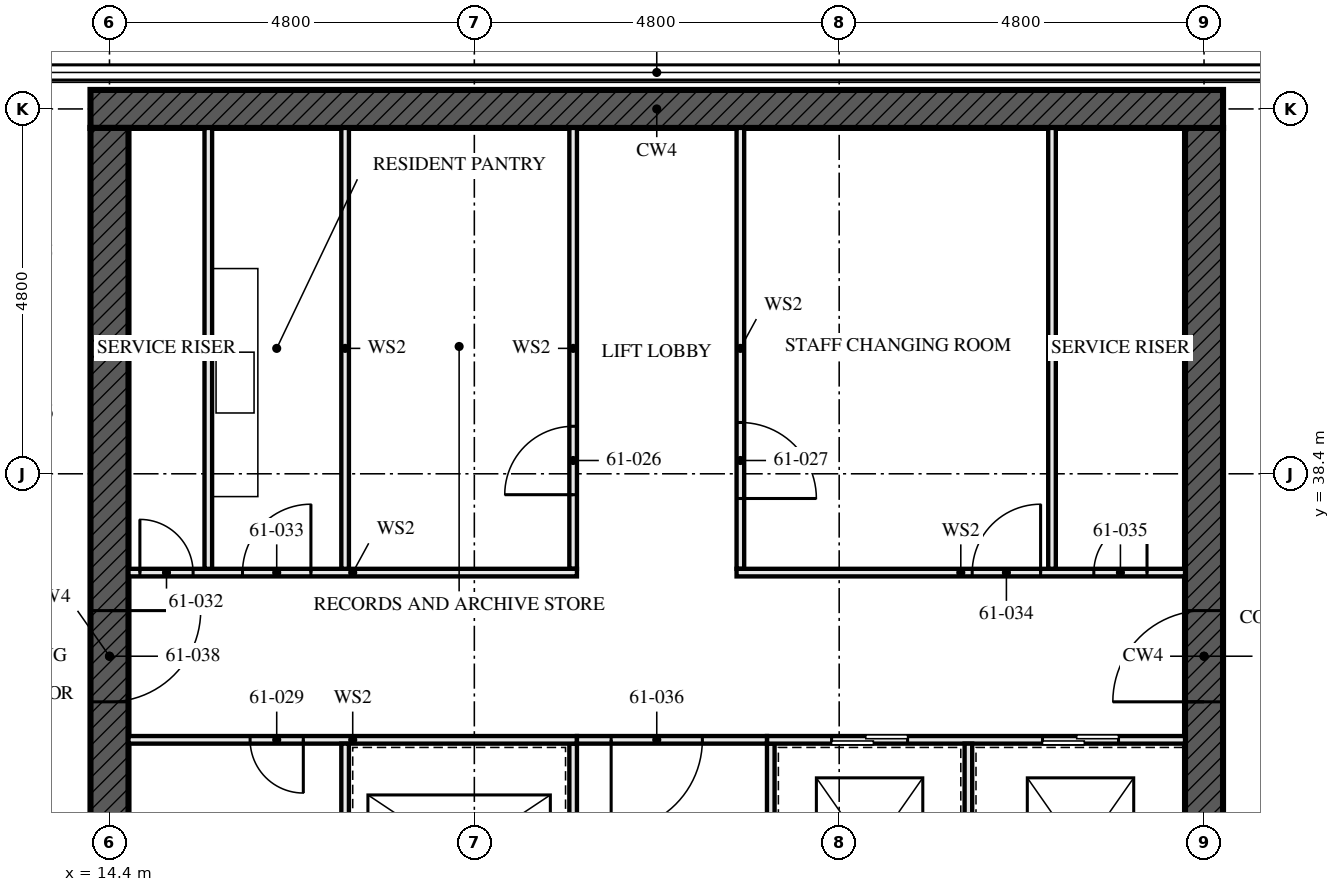
"""IFC4 building model, lengths in metres.
Left out: names, types, materials, properties, quantities, classifications, styles, units other than length and angle.
Written with IfcOpenShell. Run it as: python <this file> out.ifc"""

import sys

from ifc_helpers import new_model, si_unit, direction, frame, frame_2d, origin, place, context, subcontext, project, spatial, rectangle, extrude, element, fill, save


model = new_model("IFC4")
c1 = context("Model", 3, precision=1e-05, world=origin(), true_north=direction((0.0, 1.0)))
c2 = subcontext(c1, "Body", "Model", "MODEL_VIEW")
j1 = project(units=[si_unit("LENGTHUNIT", "METRE"), si_unit("PLANEANGLEUNIT", "RADIAN")], contexts=[c1])
p1 = place(None, origin())
s1 = spatial("IfcSite", under=j1, at=p1, CompositionType="ELEMENT")
p2 = place(p1, origin())
s2 = spatial("IfcBuilding", under=s1, at=p2, CompositionType="ELEMENT")
p3 = place(p2, frame((0.0, 0.0, 222.5)))
s3 = spatial("IfcBuildingStorey", under=s2, at=p3, CompositionType="ELEMENT", Elevation=222.5)
p4 = place(p3, frame((29.05, 43.2, -0.17), z_axis=(0.0, 0.0, 1.0), x_axis=(-1.0, 0.0, 0.0)))
e1 = element("IfcWall", 1, at=p4, inside=s3, PredefinedType="SHEAR", context=c2, shape_type="SweptSolid", body=[
    extrude(rectangle(XDim=14.9, YDim=0.5, at=frame_2d((7.45, 0.0))), origin(), (0.0, 0.0, 1.0), 3.5),
])
p5 = place(p3, frame((14.4, 42.95, -0.17), z_axis=(0.0, 0.0, 1.0), x_axis=(0.0, -1.0, 0.0)))
e2 = element("IfcWall", 2, at=p5, inside=s3, PredefinedType="SHEAR", context=c2, shape_type="SweptSolid", body=[
    extrude(rectangle(XDim=13.9, YDim=0.5, at=frame_2d((6.95, 0.0))), origin(), (0.0, 0.0, 1.0), 3.5),
])
p6 = place(p5, frame((6.35, 0.0, 0.17)))
e3 = element("IfcOpeningElement", 3, at=p6, cuts=e2, PredefinedType="OPENING", context=c2, shape_type="SweptSolid", body=[
    extrude(rectangle(XDim=1.2, YDim=2.1, at=frame_2d((0.6, 1.05))), frame((0.0, 0.26, 0.0), z_axis=(0.0, -1.0, 0.0), x_axis=(1.0, 0.0, 0.0)), (0.0, 0.0, 1.0), 0.521),
])
p7 = place(p3, frame((28.8, 29.05, -0.17), z_axis=(0.0, 0.0, 1.0), x_axis=(0.0, 1.0, 0.0)))
e4 = element("IfcWall", 4, at=p7, inside=s3, PredefinedType="SHEAR", context=c2, shape_type="SweptSolid", body=[
    extrude(rectangle(XDim=13.9, YDim=0.5, at=frame_2d((6.95, 0.0))), origin(), (0.0, 0.0, 1.0), 3.5),
])
p8 = place(p7, frame((6.35, 0.0, 0.17)))
e5 = element("IfcOpeningElement", 5, at=p8, cuts=e4, PredefinedType="OPENING", context=c2, shape_type="SweptSolid", body=[
    extrude(rectangle(XDim=1.2, YDim=2.1, at=frame_2d((0.6, 1.05))), frame((0.0, 0.26, 0.0), z_axis=(0.0, -1.0, 0.0), x_axis=(1.0, 0.0, 0.0)), (0.0, 0.0, 1.0), 0.521),
])
for number, where, z_axis, x_axis in (
    (6, (15.7, 37.15, 0.0), (0.0, 0.0, 1.0), (0.0, 1.0, 0.0)),
    (7, (26.8, 37.15, 0.0), (0.0, 0.0, 1.0), (0.0, 1.0, 0.0)),
):
    element("IfcWall", number, at=place(p3, frame(where, z_axis=z_axis, x_axis=x_axis)), inside=s3, PredefinedType="SOLIDWALL", context=c2, shape_type="SweptSolid", body=[
        extrude(rectangle(XDim=5.8, YDim=0.1, at=frame_2d((2.9, 0.0))), origin(), (0.0, 0.0, 1.0), 3.33),
    ])
p9 = place(p3, frame((20.5, 29.05, 0.0), z_axis=(0.0, 0.0, 1.0), x_axis=(0.0, 1.0, 0.0)))
e8 = element("IfcWall", 8, at=p9, inside=s3, PredefinedType="SOLIDWALL", context=c2, shape_type="SweptSolid", body=[
    extrude(rectangle(XDim=5.8, YDim=0.1, at=frame_2d((2.9, 0.0))), origin(), (0.0, 0.0, 1.0), 3.33),
])
p10 = place(p9, frame((0.8, 0.0, 0.0)))
e9 = element("IfcOpeningElement", 9, at=p10, cuts=e8, PredefinedType="OPENING", context=c2, shape_type="SweptSolid", body=[
    extrude(rectangle(XDim=1.1, YDim=2.3, at=frame_2d((0.55, 1.15))), frame((0.0, 0.061, 0.0), z_axis=(0.0, -1.0, 0.0), x_axis=(1.0, 0.0, 0.0)), (0.0, 0.0, 1.0), 0.121),
])
p11 = place(p9, frame((3.775, 0.0, 0.0)))
e10 = element("IfcOpeningElement", 10, at=p11, cuts=e8, PredefinedType="OPENING", context=c2, shape_type="SweptSolid", body=[
    extrude(rectangle(XDim=1.1, YDim=2.3, at=frame_2d((0.55, 1.15))), frame((0.0, 0.061, 0.0), z_axis=(0.0, -1.0, 0.0), x_axis=(1.0, 0.0, 0.0)), (0.0, 0.0, 1.0), 0.121),
])
p12 = place(p3, frame((20.5, 37.15, 0.0), z_axis=(0.0, 0.0, 1.0), x_axis=(0.0, 1.0, 0.0)))
e11 = element("IfcWall", 11, at=p12, inside=s3, PredefinedType="SOLIDWALL", context=c2, shape_type="SweptSolid", body=[
    extrude(rectangle(XDim=5.8, YDim=0.1, at=frame_2d((2.9, 0.0))), origin(), (0.0, 0.0, 1.0), 3.33),
])
p13 = place(p12, frame((0.975, 0.0, 0.0)))
e12 = element("IfcOpeningElement", 12, at=p13, cuts=e11, PredefinedType="OPENING", context=c2, shape_type="SweptSolid", body=[
    extrude(rectangle(XDim=0.9, YDim=2.1, at=frame_2d((0.45, 1.05))), frame((0.0, 0.061, 0.0), z_axis=(0.0, -1.0, 0.0), x_axis=(1.0, 0.0, 0.0)), (0.0, 0.0, 1.0), 0.121),
])
p14 = place(p3, frame((22.7, 37.15, 0.0), z_axis=(0.0, 0.0, 1.0), x_axis=(0.0, 1.0, 0.0)))
e13 = element("IfcWall", 13, at=p14, inside=s3, PredefinedType="SOLIDWALL", context=c2, shape_type="SweptSolid", body=[
    extrude(rectangle(XDim=5.8, YDim=0.1, at=frame_2d((2.9, 0.0))), origin(), (0.0, 0.0, 1.0), 3.33),
])
p15 = place(p14, frame((0.925, 0.0, 0.0)))
e14 = element("IfcOpeningElement", 14, at=p15, cuts=e13, PredefinedType="OPENING", context=c2, shape_type="SweptSolid", body=[
    extrude(rectangle(XDim=1.0, YDim=2.1, at=frame_2d((0.5, 1.05))), frame((0.0, 0.061, 0.0), z_axis=(0.0, -1.0, 0.0), x_axis=(1.0, 0.0, 0.0)), (0.0, 0.0, 1.0), 0.121),
])
p16 = place(p3, frame((23.1, 29.05, 0.0), z_axis=(0.0, 0.0, 1.0), x_axis=(0.0, 1.0, 0.0)))
e15 = element("IfcWall", 15, at=p16, inside=s3, PredefinedType="SOLIDWALL", context=c2, shape_type="SweptSolid", body=[
    extrude(rectangle(XDim=5.8, YDim=0.1, at=frame_2d((2.9, 0.0))), origin(), (0.0, 0.0, 1.0), 3.33),
])
p17 = place(p16, frame((1.0, 0.0, 0.0)))
e16 = element("IfcOpeningElement", 16, at=p17, cuts=e15, PredefinedType="OPENING", context=c2, shape_type="SweptSolid", body=[
    extrude(rectangle(XDim=0.7, YDim=2.1, at=frame_2d((0.35, 1.05))), frame((0.0, 0.061, 0.0), z_axis=(0.0, -1.0, 0.0), x_axis=(1.0, 0.0, 0.0)), (0.0, 0.0, 1.0), 0.121),
])
p18 = place(p3, frame((14.65, 34.9, 0.0), z_axis=(0.0, 0.0, 1.0), x_axis=(1.0, 0.0, 0.0)))
e17 = element("IfcWall", 17, at=p18, inside=s3, PredefinedType="SOLIDWALL", context=c2, shape_type="SweptSolid", body=[
    extrude(rectangle(XDim=5.9, YDim=0.1, at=frame_2d((2.95, 0.0))), origin(), (0.0, 0.0, 1.0), 3.33),
])
p19 = place(p18, frame((1.6, 0.0, 0.0)))
e18 = element("IfcOpeningElement", 18, at=p19, cuts=e17, PredefinedType="OPENING", context=c2, shape_type="SweptSolid", body=[
    extrude(rectangle(XDim=0.7, YDim=2.1, at=frame_2d((0.35, 1.05))), frame((0.0, 0.061, 0.0), z_axis=(0.0, -1.0, 0.0), x_axis=(1.0, 0.0, 0.0)), (0.0, 0.0, 1.0), 0.121),
])
p20 = place(p3, frame((23.05, 34.9, 0.0), z_axis=(0.0, 0.0, 1.0), x_axis=(1.0, 0.0, 0.0)))
e19 = element("IfcWall", 19, at=p20, inside=s3, PredefinedType="SOLIDWALL", context=c2, shape_type="SweptSolid", body=[
    extrude(rectangle(XDim=5.5, YDim=0.1, at=frame_2d((2.75, 0.0))), origin(), (0.0, 0.0, 1.0), 3.33),
])
p21 = place(p20, frame((0.85, 0.0, 0.0)))
e20 = element("IfcOpeningElement", 20, at=p21, cuts=e19, PredefinedType="OPENING", context=c2, shape_type="SweptSolid", body=[
    extrude(rectangle(XDim=1.0, YDim=2.1, at=frame_2d((0.5, 1.05))), frame((0.0, 0.061, 0.0), z_axis=(0.0, -1.0, 0.0), x_axis=(1.0, 0.0, 0.0)), (0.0, 0.0, 1.0), 0.121),
])
p22 = place(p20, frame((3.625, 0.0, 0.0)))
e21 = element("IfcOpeningElement", 21, at=p22, cuts=e19, PredefinedType="OPENING", context=c2, shape_type="SweptSolid", body=[
    extrude(rectangle(XDim=1.0, YDim=2.1, at=frame_2d((0.5, 1.05))), frame((0.0, 0.061, 0.0), z_axis=(0.0, -1.0, 0.0), x_axis=(1.0, 0.0, 0.0)), (0.0, 0.0, 1.0), 0.121),
])
p23 = place(p3, frame((14.65, 37.1, 0.0), z_axis=(0.0, 0.0, 1.0), x_axis=(1.0, 0.0, 0.0)))
e22 = element("IfcWall", 22, at=p23, inside=s3, PredefinedType="SOLIDWALL", context=c2, shape_type="SweptSolid", body=[
    extrude(rectangle(XDim=5.9, YDim=0.1, at=frame_2d((2.95, 0.0))), origin(), (0.0, 0.0, 1.0), 3.33),
])
p24 = place(p23, frame((0.15, 0.0, 0.0)))
e23 = element("IfcOpeningElement", 23, at=p24, cuts=e22, PredefinedType="OPENING", context=c2, shape_type="SweptSolid", body=[
    extrude(rectangle(XDim=0.7, YDim=2.1, at=frame_2d((0.35, 1.05))), frame((0.0, 0.061, 0.0), z_axis=(0.0, -1.0, 0.0), x_axis=(1.0, 0.0, 0.0)), (0.0, 0.0, 1.0), 0.121),
])
p25 = place(p23, frame((1.5, 0.0, 0.0)))
e24 = element("IfcOpeningElement", 24, at=p25, cuts=e22, PredefinedType="OPENING", context=c2, shape_type="SweptSolid", body=[
    extrude(rectangle(XDim=0.9, YDim=2.1, at=frame_2d((0.45, 1.05))), frame((0.0, 0.061, 0.0), z_axis=(0.0, -1.0, 0.0), x_axis=(1.0, 0.0, 0.0)), (0.0, 0.0, 1.0), 0.121),
])
p26 = place(p3, frame((22.65, 37.1, 0.0), z_axis=(0.0, 0.0, 1.0), x_axis=(1.0, 0.0, 0.0)))
e25 = element("IfcWall", 25, at=p26, inside=s3, PredefinedType="SOLIDWALL", context=c2, shape_type="SweptSolid", body=[
    extrude(rectangle(XDim=5.9, YDim=0.1, at=frame_2d((2.95, 0.0))), origin(), (0.0, 0.0, 1.0), 3.33),
])
p27 = place(p26, frame((3.1, 0.0, 0.0)))
e26 = element("IfcOpeningElement", 26, at=p27, cuts=e25, PredefinedType="OPENING", context=c2, shape_type="SweptSolid", body=[
    extrude(rectangle(XDim=0.9, YDim=2.1, at=frame_2d((0.45, 1.05))), frame((0.0, 0.061, 0.0), z_axis=(0.0, -1.0, 0.0), x_axis=(1.0, 0.0, 0.0)), (0.0, 0.0, 1.0), 0.121),
])
p28 = place(p26, frame((4.7, 0.0, 0.0)))
e27 = element("IfcOpeningElement", 27, at=p28, cuts=e25, PredefinedType="OPENING", context=c2, shape_type="SweptSolid", body=[
    extrude(rectangle(XDim=0.7, YDim=2.1, at=frame_2d((0.35, 1.05))), frame((0.0, 0.061, 0.0), z_axis=(0.0, -1.0, 0.0), x_axis=(1.0, 0.0, 0.0)), (0.0, 0.0, 1.0), 0.121),
])
p29 = place(p3, frame((20.55, 34.9, 0.0), z_axis=(0.0, 0.0, 1.0), x_axis=(1.0, 0.0, 0.0)))
e28 = element("IfcWall", 28, at=p29, inside=s3, PredefinedType="SOLIDWALL", context=c2, shape_type="SweptSolid", body=[
    extrude(rectangle(XDim=2.5, YDim=0.1, at=frame_2d((1.25, 0.0))), origin(), (0.0, 0.0, 1.0), 3.33),
])
p30 = place(p29, frame((0.45, 0.0, 0.0)))
e29 = element("IfcOpeningElement", 29, at=p30, cuts=e28, PredefinedType="OPENING", context=c2, shape_type="SweptSolid", body=[
    extrude(rectangle(XDim=1.2, YDim=2.1, at=frame_2d((0.6, 1.05))), frame((0.0, 0.061, 0.0), z_axis=(0.0, -1.0, 0.0), x_axis=(1.0, 0.0, 0.0)), (0.0, 0.0, 1.0), 0.121),
])
for number, where, z_axis, x_axis in (
    (30, (17.5, 29.05, 0.0), (0.0, 0.0, 1.0), (0.0, 1.0, 0.0)),
    (31, (17.5, 37.15, 0.0), (0.0, 0.0, 1.0), (0.0, 1.0, 0.0)),
):
    element("IfcWall", number, at=place(p3, frame(where, z_axis=z_axis, x_axis=x_axis)), inside=s3, PredefinedType="SOLIDWALL", context=c2, shape_type="SweptSolid", body=[
        extrude(rectangle(XDim=5.8, YDim=0.1, at=frame_2d((2.9, 0.0))), origin(), (0.0, 0.0, 1.0), 3.33),
    ])
p31 = place(p3, frame((25.7, 31.95, 0.0), z_axis=(0.0, 0.0, 1.0), x_axis=(0.0, 1.0, 0.0)))
e32 = element("IfcWall", 32, at=p31, inside=s3, PredefinedType="SOLIDWALL", context=c2, shape_type="SweptSolid", body=[
    extrude(rectangle(XDim=2.9, YDim=0.1, at=frame_2d((1.45, 0.0))), origin(), (0.0, 0.0, 1.0), 3.33),
])
p32 = place(p13, origin())
e33 = element("IfcDoor", 33, at=p32, inside=s3, OperationType="SINGLE_SWING_RIGHT", PredefinedType="DOOR", context=c2, shape_type="SweptSolid", body=[
    extrude(rectangle(XDim=0.9, YDim=2.1, at=frame_2d((0.45, 1.05))), frame((0.0, 0.027, 0.0), z_axis=(0.0, -1.0, 0.0), x_axis=(1.0, 0.0, 0.0)), (0.0, 0.0, 1.0), 0.054),
])
fill(e12, e33)
p33 = place(p15, frame((1.0, 0.0, 0.0), z_axis=(0.0, 0.0, 1.0), x_axis=(-1.0, 0.0, 0.0)))
e34 = element("IfcDoor", 34, at=p33, inside=s3, OperationType="SINGLE_SWING_LEFT", PredefinedType="DOOR", context=c2, shape_type="SweptSolid", body=[
    extrude(rectangle(XDim=1.0, YDim=2.1, at=frame_2d((0.5, 1.05))), frame((0.0, 0.027, 0.0), z_axis=(0.0, -1.0, 0.0), x_axis=(1.0, 0.0, 0.0)), (0.0, 0.0, 1.0), 0.054),
])
fill(e14, e34)
p34 = place(p19, frame((0.7, 0.0, 0.0), z_axis=(0.0, 0.0, 1.0), x_axis=(-1.0, 0.0, 0.0)))
e35 = element("IfcDoor", 35, at=p34, inside=s3, OperationType="SINGLE_SWING_RIGHT", PredefinedType="DOOR", context=c2, shape_type="SweptSolid", body=[
    extrude(rectangle(XDim=0.7, YDim=2.1, at=frame_2d((0.35, 1.05))), frame((0.0, 0.027, 0.0), z_axis=(0.0, -1.0, 0.0), x_axis=(1.0, 0.0, 0.0)), (0.0, 0.0, 1.0), 0.054),
])
fill(e18, e35)
p35 = place(p21, origin())
e36 = element("IfcDoor", 36, at=p35, inside=s3, OperationType="SLIDING_TO_LEFT", PredefinedType="DOOR", context=c2, shape_type="SweptSolid", body=[
    extrude(rectangle(XDim=1.0, YDim=2.1, at=frame_2d((0.5, 1.05))), frame((0.0, 0.05, 0.0), z_axis=(0.0, -1.0, 0.0), x_axis=(1.0, 0.0, 0.0)), (0.0, 0.0, 1.0), 0.1),
])
fill(e20, e36)
p36 = place(p22, origin())
e37 = element("IfcDoor", 37, at=p36, inside=s3, OperationType="SLIDING_TO_LEFT", PredefinedType="DOOR", context=c2, shape_type="SweptSolid", body=[
    extrude(rectangle(XDim=1.0, YDim=2.1, at=frame_2d((0.5, 1.05))), frame((0.0, 0.05, 0.0), z_axis=(0.0, -1.0, 0.0), x_axis=(1.0, 0.0, 0.0)), (0.0, 0.0, 1.0), 0.1),
])
fill(e21, e37)
p37 = place(p24, origin())
e38 = element("IfcDoor", 38, at=p37, inside=s3, OperationType="SINGLE_SWING_RIGHT", PredefinedType="DOOR", context=c2, shape_type="SweptSolid", body=[
    extrude(rectangle(XDim=0.7, YDim=2.1, at=frame_2d((0.35, 1.05))), frame((0.0, 0.027, 0.0), z_axis=(0.0, -1.0, 0.0), x_axis=(1.0, 0.0, 0.0)), (0.0, 0.0, 1.0), 0.054),
])
fill(e23, e38)
p38 = place(p25, origin())
e39 = element("IfcDoor", 39, at=p38, inside=s3, OperationType="SINGLE_SWING_LEFT", PredefinedType="DOOR", context=c2, shape_type="SweptSolid", body=[
    extrude(rectangle(XDim=0.9, YDim=2.1, at=frame_2d((0.45, 1.05))), frame((0.0, 0.027, 0.0), z_axis=(0.0, -1.0, 0.0), x_axis=(1.0, 0.0, 0.0)), (0.0, 0.0, 1.0), 0.054),
])
fill(e24, e39)
p39 = place(p27, origin())
e40 = element("IfcDoor", 40, at=p39, inside=s3, OperationType="SINGLE_SWING_LEFT", PredefinedType="DOOR", context=c2, shape_type="SweptSolid", body=[
    extrude(rectangle(XDim=0.9, YDim=2.1, at=frame_2d((0.45, 1.05))), frame((0.0, 0.027, 0.0), z_axis=(0.0, -1.0, 0.0), x_axis=(1.0, 0.0, 0.0)), (0.0, 0.0, 1.0), 0.054),
])
fill(e26, e40)
p40 = place(p28, origin())
e41 = element("IfcDoor", 41, at=p40, inside=s3, OperationType="SINGLE_SWING_LEFT", PredefinedType="DOOR", context=c2, shape_type="SweptSolid", body=[
    extrude(rectangle(XDim=0.7, YDim=2.1, at=frame_2d((0.35, 1.05))), frame((0.0, 0.027, 0.0), z_axis=(0.0, -1.0, 0.0), x_axis=(1.0, 0.0, 0.0)), (0.0, 0.0, 1.0), 0.054),
])
fill(e27, e41)
p41 = place(p30, frame((1.2, 0.0, 0.0), z_axis=(0.0, 0.0, 1.0), x_axis=(-1.0, 0.0, 0.0)))
e42 = element("IfcDoor", 42, at=p41, inside=s3, OperationType="SINGLE_SWING_LEFT", PredefinedType="DOOR", context=c2, shape_type="SweptSolid", body=[
    extrude(rectangle(XDim=1.2, YDim=2.1, at=frame_2d((0.6, 1.05))), frame((0.0, 0.027, 0.0), z_axis=(0.0, -1.0, 0.0), x_axis=(1.0, 0.0, 0.0)), (0.0, 0.0, 1.0), 0.054),
])
fill(e29, e42)
p42 = place(p6, origin())
e43 = element("IfcDoor", 43, at=p42, inside=s3, OperationType="SINGLE_SWING_LEFT", PredefinedType="DOOR", context=c2, shape_type="SweptSolid", body=[
    extrude(rectangle(XDim=1.2, YDim=2.1, at=frame_2d((0.6, 1.05))), frame((0.0, 0.027, 0.0), z_axis=(0.0, -1.0, 0.0), x_axis=(1.0, 0.0, 0.0)), (0.0, 0.0, 1.0), 0.054),
])
fill(e3, e43)
p43 = place(p8, origin())
e44 = element("IfcDoor", 44, at=p43, inside=s3, OperationType="SINGLE_SWING_LEFT", PredefinedType="DOOR", context=c2, shape_type="SweptSolid", body=[
    extrude(rectangle(XDim=1.2, YDim=2.1, at=frame_2d((0.6, 1.05))), frame((0.0, 0.027, 0.0), z_axis=(0.0, -1.0, 0.0), x_axis=(1.0, 0.0, 0.0)), (0.0, 0.0, 1.0), 0.054),
])
fill(e5, e44)
save(model, sys.argv[1])
